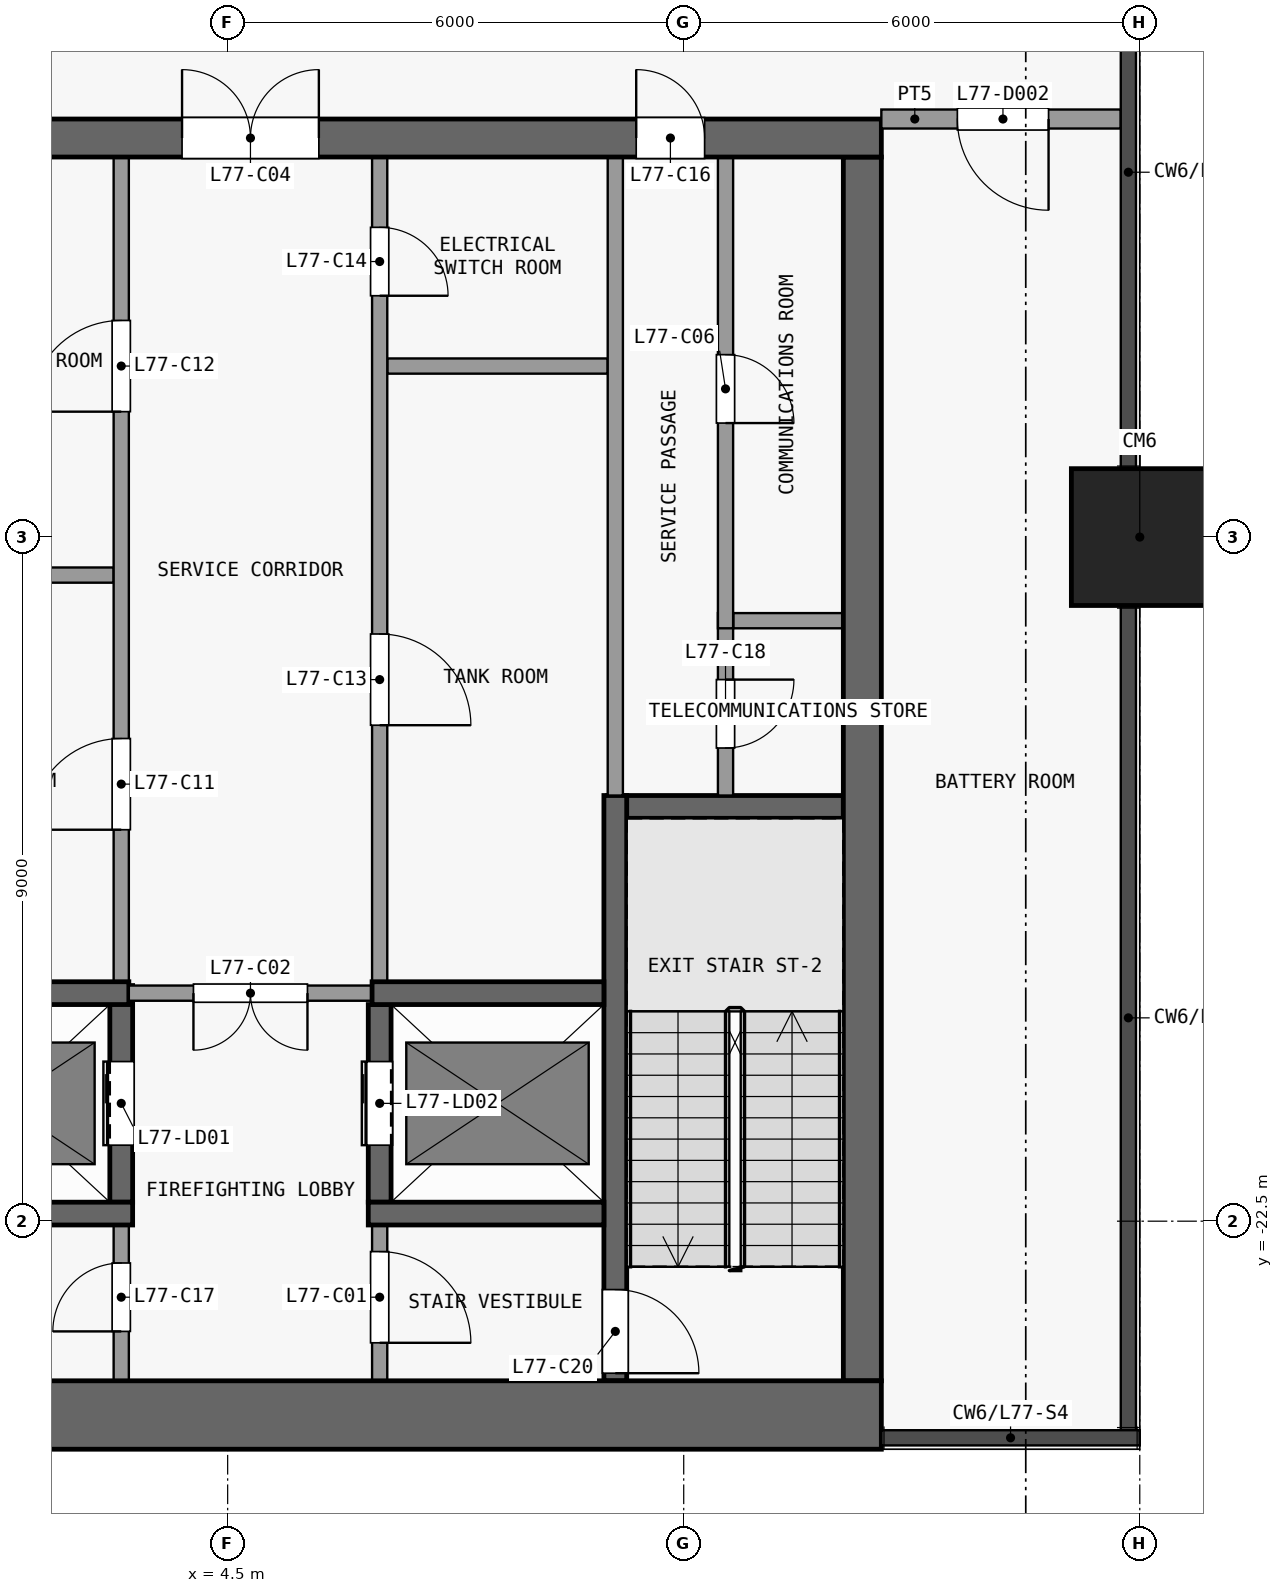
"""IFC4 building model, lengths in metres.
Left out: names, types, materials, properties, quantities, classifications, styles, units other than length and angle.
Written with IfcOpenShell. Run it as: python <this file> out.ifc"""

import sys

from ifc_helpers import new_model, si_unit, direction, frame, frame_2d, origin, origin_2d, place, context, subcontext, project, spatial, rectangle, extrude, element, fill, save


model = new_model("IFC4")
c1 = context("Model", 3, precision=1e-05, world=origin(), true_north=direction((0.0, 1.0)))
c2 = subcontext(c1, "Body", "Model", "MODEL_VIEW")
j1 = project(units=[si_unit("LENGTHUNIT", "METRE"), si_unit("PLANEANGLEUNIT", "RADIAN")], contexts=[c1])
p1 = place(None, origin())
s1 = spatial("IfcSite", under=j1, at=p1, CompositionType="ELEMENT")
p2 = place(p1, origin())
s2 = spatial("IfcBuilding", under=s1, at=p2, CompositionType="ELEMENT")
p3 = place(p2, frame((0.0, 0.0, 303.2)))
s3 = spatial("IfcBuildingStorey", under=s2, at=p3, CompositionType="ELEMENT", Elevation=303.2)
p4 = place(p3, frame((16.5, -13.5, 0.0), z_axis=(0.0, 0.0, 1.0), x_axis=(1.0, 0.0, 0.0)))
e1 = element("IfcColumn", 1, at=p4, inside=s3, PredefinedType="COLUMN", context=c2, shape_type="SweptSolid", body=[
    extrude(rectangle(XDim=1.8, YDim=1.8, at=origin_2d()), origin(), (0.0, 0.0, 1.0), 4.5),
])
p5 = place(p3, frame((-13.1, -25.05, 0.0), z_axis=(0.0, 0.0, 1.0), x_axis=(1.0, 0.0, 0.0)))
e2 = element("IfcWall", 2, at=p5, inside=s3, PredefinedType="SHEAR", context=c2, shape_type="SweptSolid", body=[
    extrude(rectangle(XDim=26.2, YDim=0.9, at=frame_2d((13.1, 0.0))), origin(), (0.0, 0.0, 1.0), 4.2),
])
p6 = place(p3, frame((-13.1, -8.25, 0.0), z_axis=(0.0, 0.0, 1.0), x_axis=(1.0, 0.0, 0.0)))
e3 = element("IfcWall", 3, at=p6, inside=s3, PredefinedType="SHEAR", context=c2, shape_type="SweptSolid", body=[
    extrude(rectangle(XDim=26.2, YDim=0.5, at=frame_2d((13.1, 0.0))), origin(), (0.0, 0.0, 1.0), 4.2),
])
p7 = place(p6, frame((7.4, 0.0, 0.0)))
e4 = element("IfcOpeningElement", 4, at=p7, cuts=e3, PredefinedType="OPENING", context=c2, shape_type="SweptSolid", body=[
    extrude(rectangle(XDim=1.8, YDim=2.1, at=frame_2d((0.9, 1.05))), frame((0.0, 0.26, 0.0), z_axis=(0.0, -1.0, 0.0), x_axis=(1.0, 0.0, 0.0)), (0.0, 0.0, 1.0), 0.52),
])
p8 = place(p6, frame((17.0, 0.0, 0.0)))
e5 = element("IfcOpeningElement", 5, at=p8, cuts=e3, PredefinedType="OPENING", context=c2, shape_type="SweptSolid", body=[
    extrude(rectangle(XDim=1.8, YDim=2.1, at=frame_2d((0.9, 1.05))), frame((0.0, 0.26, 0.0), z_axis=(0.0, -1.0, 0.0), x_axis=(1.0, 0.0, 0.0)), (0.0, 0.0, 1.0), 0.52),
])
p9 = place(p6, frame((1.325, 0.0, 0.0)))
e6 = element("IfcOpeningElement", 6, at=p9, cuts=e3, PredefinedType="OPENING", context=c2, shape_type="SweptSolid", body=[
    extrude(rectangle(XDim=1.2, YDim=2.1, at=frame_2d((0.6, 1.05))), frame((0.0, 0.26, 0.0), z_axis=(0.0, -1.0, 0.0), x_axis=(1.0, 0.0, 0.0)), (0.0, 0.0, 1.0), 0.52),
])
p10 = place(p6, frame((22.975, 0.0, 0.0)))
e7 = element("IfcOpeningElement", 7, at=p10, cuts=e3, PredefinedType="OPENING", context=c2, shape_type="SweptSolid", body=[
    extrude(rectangle(XDim=0.9, YDim=2.1, at=frame_2d((0.45, 1.05))), frame((0.0, 0.26, 0.0), z_axis=(0.0, -1.0, 0.0), x_axis=(1.0, 0.0, 0.0)), (0.0, 0.0, 1.0), 0.52),
])
p11 = place(p3, frame((12.85, -24.6, 0.0), z_axis=(0.0, 0.0, 1.0), x_axis=(0.0, 1.0, 0.0)))
e8 = element("IfcWall", 8, at=p11, inside=s3, PredefinedType="SHEAR", context=c2, shape_type="SweptSolid", body=[
    extrude(rectangle(XDim=16.1, YDim=0.5, at=frame_2d((8.05, 0.0))), origin(), (0.0, 0.0, 1.0), 4.2),
])
p12 = place(p3, frame((-3.25, -22.4, 0.0), z_axis=(0.0, 0.0, 1.0), x_axis=(1.0, 0.0, 0.0)))
e9 = element("IfcWall", 9, at=p12, inside=s3, PredefinedType="SHEAR", context=c2, shape_type="SweptSolid", body=[
    extrude(rectangle(XDim=6.5, YDim=0.3, at=frame_2d((3.25, 0.0))), origin(), (0.0, 0.0, 1.0), 4.2),
])
p13 = place(p3, frame((6.35, -22.4, 0.0), z_axis=(0.0, 0.0, 1.0), x_axis=(1.0, 0.0, 0.0)))
e10 = element("IfcWall", 10, at=p13, inside=s3, PredefinedType="SHEAR", context=c2, shape_type="SweptSolid", body=[
    extrude(rectangle(XDim=3.1, YDim=0.3, at=frame_2d((1.55, 0.0))), origin(), (0.0, 0.0, 1.0), 4.2),
])
p14 = place(p3, frame((-0.1, -19.5, 0.0), z_axis=(0.0, 0.0, 1.0), x_axis=(1.0, 0.0, 0.0)))
e11 = element("IfcWall", 11, at=p14, inside=s3, PredefinedType="SHEAR", context=c2, shape_type="SweptSolid", body=[
    extrude(rectangle(XDim=3.3, YDim=0.3, at=frame_2d((1.65, 0.0))), origin(), (0.0, 0.0, 1.0), 4.2),
])
p15 = place(p3, frame((6.4, -19.5, 0.0), z_axis=(0.0, 0.0, 1.0), x_axis=(-1.0, 0.0, 0.0)))
e12 = element("IfcWall", 12, at=p15, inside=s3, PredefinedType="PARTITIONING", context=c2, shape_type="SweptSolid", body=[
    extrude(rectangle(XDim=3.2, YDim=0.2, at=frame_2d((1.6, 0.0))), origin(), (0.0, 0.0, 1.0), 4.2),
])
p16 = place(p15, frame((0.85, 0.0, 0.0)))
e13 = element("IfcOpeningElement", 13, at=p16, cuts=e12, PredefinedType="OPENING", context=c2, shape_type="SweptSolid", body=[
    extrude(rectangle(XDim=1.5, YDim=2.1, at=frame_2d((0.75, 1.05))), frame((0.0, 0.11, 0.0), z_axis=(0.0, -1.0, 0.0), x_axis=(1.0, 0.0, 0.0)), (0.0, 0.0, 1.0), 0.22),
])
p17 = place(p3, frame((6.4, -19.5, 0.0), z_axis=(0.0, 0.0, 1.0), x_axis=(1.0, 0.0, 0.0)))
e14 = element("IfcWall", 14, at=p17, inside=s3, PredefinedType="SHEAR", context=c2, shape_type="SweptSolid", body=[
    extrude(rectangle(XDim=3.05, YDim=0.3, at=frame_2d((1.525, 0.0))), origin(), (0.0, 0.0, 1.0), 4.2),
])
p18 = place(p3, frame((9.5, -17.05, 0.0), z_axis=(0.0, 0.0, 1.0), x_axis=(1.0, 0.0, 0.0)))
e15 = element("IfcWall", 15, at=p18, inside=s3, PredefinedType="SHEAR", context=c2, shape_type="SweptSolid", body=[
    extrude(rectangle(XDim=3.1, YDim=0.3, at=frame_2d((1.55, 0.0))), origin(), (0.0, 0.0, 1.0), 4.2),
])
p19 = place(p3, frame((11.15, -14.6, 0.0), z_axis=(0.0, 0.0, 1.0), x_axis=(1.0, 0.0, 0.0)))
e16 = element("IfcWall", 16, at=p19, inside=s3, PredefinedType="PARTITIONING", context=c2, shape_type="SweptSolid", body=[
    extrude(rectangle(XDim=1.45, YDim=0.2, at=frame_2d((0.725, 0.0))), origin(), (0.0, 0.0, 1.0), 4.2),
])
for number, where, z_axis, x_axis in (
    (17, (0.1, -14.0, 0.0), (0.0, 0.0, 1.0), (1.0, 0.0, 0.0)),
    (18, (6.6, -11.25, 0.0), (0.0, 0.0, 1.0), (1.0, 0.0, 0.0)),
):
    element("IfcWall", number, at=place(p3, frame(where, z_axis=z_axis, x_axis=x_axis)), inside=s3, PredefinedType="PARTITIONING", context=c2, shape_type="SweptSolid", body=[
        extrude(rectangle(XDim=2.9, YDim=0.2, at=frame_2d((1.45, 0.0))), origin(), (0.0, 0.0, 1.0), 4.2),
    ])
p20 = place(p3, frame((3.1, -24.6, 0.0), z_axis=(0.0, 0.0, 1.0), x_axis=(0.0, 1.0, 0.0)))
e19 = element("IfcWall", 19, at=p20, inside=s3, PredefinedType="PARTITIONING", context=c2, shape_type="SweptSolid", body=[
    extrude(rectangle(XDim=2.05, YDim=0.2, at=frame_2d((1.025, 0.0))), origin(), (0.0, 0.0, 1.0), 4.2),
])
p21 = place(p20, frame((0.65, 0.0, 0.0)))
e20 = element("IfcOpeningElement", 20, at=p21, cuts=e19, PredefinedType="OPENING", context=c2, shape_type="SweptSolid", body=[
    extrude(rectangle(XDim=0.9, YDim=2.1, at=frame_2d((0.45, 1.05))), frame((0.0, 0.11, 0.0), z_axis=(0.0, -1.0, 0.0), x_axis=(1.0, 0.0, 0.0)), (0.0, 0.0, 1.0), 0.22),
])
p22 = place(p3, frame((3.1, -22.25, 0.0), z_axis=(0.0, 0.0, 1.0), x_axis=(0.0, 1.0, 0.0)))
e21 = element("IfcWall", 21, at=p22, inside=s3, PredefinedType="SHEAR", context=c2, shape_type="SweptSolid", body=[
    extrude(rectangle(XDim=2.85, YDim=0.3, at=frame_2d((1.425, 0.0))), origin(), (0.0, 0.0, 1.0), 4.2),
])
p23 = place(p22, frame((0.75, 0.0, 0.0)))
e22 = element("IfcOpeningElement", 22, at=p23, cuts=e21, PredefinedType="OPENING", context=c2, shape_type="SweptSolid", body=[
    extrude(rectangle(XDim=1.1, YDim=2.1, at=frame_2d((0.55, 1.05))), frame((0.0, 0.16, 0.0), z_axis=(0.0, -1.0, 0.0), x_axis=(1.0, 0.0, 0.0)), (0.0, 0.0, 1.0), 0.32),
])
p24 = place(p3, frame((3.1, -19.6, 0.0), z_axis=(0.0, 0.0, 1.0), x_axis=(0.0, 1.0, 0.0)))
e23 = element("IfcWall", 23, at=p24, inside=s3, PredefinedType="PARTITIONING", context=c2, shape_type="SweptSolid", body=[
    extrude(rectangle(XDim=11.1, YDim=0.2, at=frame_2d((5.55, 0.0))), origin(), (0.0, 0.0, 1.0), 4.2),
])
p25 = place(p24, frame((2.25, 0.0, 0.0)))
e24 = element("IfcOpeningElement", 24, at=p25, cuts=e23, PredefinedType="OPENING", context=c2, shape_type="SweptSolid", body=[
    extrude(rectangle(XDim=1.2, YDim=2.1, at=frame_2d((0.6, 1.05))), frame((0.0, 0.11, 0.0), z_axis=(0.0, -1.0, 0.0), x_axis=(1.0, 0.0, 0.0)), (0.0, 0.0, 1.0), 0.22),
])
p26 = place(p24, frame((7.75, 0.0, 0.0)))
e25 = element("IfcOpeningElement", 25, at=p26, cuts=e23, PredefinedType="OPENING", context=c2, shape_type="SweptSolid", body=[
    extrude(rectangle(XDim=1.2, YDim=2.1, at=frame_2d((0.6, 1.05))), frame((0.0, 0.11, 0.0), z_axis=(0.0, -1.0, 0.0), x_axis=(1.0, 0.0, 0.0)), (0.0, 0.0, 1.0), 0.22),
])
p27 = place(p3, frame((6.5, -22.55, 0.0), z_axis=(0.0, 0.0, 1.0), x_axis=(0.0, -1.0, 0.0)))
e26 = element("IfcWall", 26, at=p27, inside=s3, PredefinedType="PARTITIONING", context=c2, shape_type="SweptSolid", body=[
    extrude(rectangle(XDim=2.05, YDim=0.2, at=frame_2d((1.025, 0.0))), origin(), (0.0, 0.0, 1.0), 4.2),
])
p28 = place(p27, frame((0.35, 0.0, 0.0)))
e27 = element("IfcOpeningElement", 27, at=p28, cuts=e26, PredefinedType="OPENING", context=c2, shape_type="SweptSolid", body=[
    extrude(rectangle(XDim=1.2, YDim=2.1, at=frame_2d((0.6, 1.05))), frame((0.0, 0.11, 0.0), z_axis=(0.0, -1.0, 0.0), x_axis=(1.0, 0.0, 0.0)), (0.0, 0.0, 1.0), 0.22),
])
p29 = place(p3, frame((6.5, -22.25, 0.0), z_axis=(0.0, 0.0, 1.0), x_axis=(0.0, 1.0, 0.0)))
e28 = element("IfcWall", 28, at=p29, inside=s3, PredefinedType="SHEAR", context=c2, shape_type="SweptSolid", body=[
    extrude(rectangle(XDim=2.6, YDim=0.3, at=frame_2d((1.3, 0.0))), origin(), (0.0, 0.0, 1.0), 4.2),
])
p30 = place(p29, frame((0.75, 0.0, 0.0)))
e29 = element("IfcOpeningElement", 29, at=p30, cuts=e28, PredefinedType="OPENING", context=c2, shape_type="SweptSolid", body=[
    extrude(rectangle(XDim=1.1, YDim=2.1, at=frame_2d((0.55, 1.05))), frame((0.0, 0.16, 0.0), z_axis=(0.0, -1.0, 0.0), x_axis=(1.0, 0.0, 0.0)), (0.0, 0.0, 1.0), 0.32),
])
p31 = place(p3, frame((6.5, -8.5, 0.0), z_axis=(0.0, 0.0, 1.0), x_axis=(0.0, -1.0, 0.0)))
e30 = element("IfcWall", 30, at=p31, inside=s3, PredefinedType="PARTITIONING", context=c2, shape_type="SweptSolid", body=[
    extrude(rectangle(XDim=10.85, YDim=0.2, at=frame_2d((5.425, 0.0))), origin(), (0.0, 0.0, 1.0), 4.2),
])
p32 = place(p31, frame((6.275, 0.0, 0.0)))
e31 = element("IfcOpeningElement", 31, at=p32, cuts=e30, PredefinedType="OPENING", context=c2, shape_type="SweptSolid", body=[
    extrude(rectangle(XDim=1.2, YDim=2.1, at=frame_2d((0.6, 1.05))), frame((0.0, 0.11, 0.0), z_axis=(0.0, -1.0, 0.0), x_axis=(1.0, 0.0, 0.0)), (0.0, 0.0, 1.0), 0.22),
])
p33 = place(p31, frame((0.925, 0.0, 0.0)))
e32 = element("IfcOpeningElement", 32, at=p33, cuts=e30, PredefinedType="OPENING", context=c2, shape_type="SweptSolid", body=[
    extrude(rectangle(XDim=0.9, YDim=2.1, at=frame_2d((0.45, 1.05))), frame((0.0, 0.11, 0.0), z_axis=(0.0, -1.0, 0.0), x_axis=(1.0, 0.0, 0.0)), (0.0, 0.0, 1.0), 0.22),
])
p34 = place(p3, frame((9.6, -16.9, 0.0), z_axis=(0.0, 0.0, 1.0), x_axis=(0.0, -1.0, 0.0)))
e33 = element("IfcWall", 33, at=p34, inside=s3, PredefinedType="SHEAR", context=c2, shape_type="SweptSolid", body=[
    extrude(rectangle(XDim=7.7, YDim=0.3, at=frame_2d((3.85, 0.0))), origin(), (0.0, 0.0, 1.0), 4.2),
])
p35 = place(p34, frame((6.5, 0.0, 0.0)))
e34 = element("IfcOpeningElement", 34, at=p35, cuts=e33, PredefinedType="OPENING", context=c2, shape_type="SweptSolid", body=[
    extrude(rectangle(XDim=1.1, YDim=2.1, at=frame_2d((0.55, 1.05))), frame((0.0, 0.16, 0.0), z_axis=(0.0, -1.0, 0.0), x_axis=(1.0, 0.0, 0.0)), (0.0, 0.0, 1.0), 0.32),
])
p36 = place(p3, frame((9.6, -16.9, 0.0), z_axis=(0.0, 0.0, 1.0), x_axis=(0.0, 1.0, 0.0)))
e35 = element("IfcWall", 35, at=p36, inside=s3, PredefinedType="PARTITIONING", context=c2, shape_type="SweptSolid", body=[
    extrude(rectangle(XDim=8.4, YDim=0.2, at=frame_2d((4.2, 0.0))), origin(), (0.0, 0.0, 1.0), 4.2),
])
p37 = place(p3, frame((11.05, -14.5, 0.0), z_axis=(0.0, 0.0, 1.0), x_axis=(0.0, -1.0, 0.0)))
e36 = element("IfcWall", 36, at=p37, inside=s3, PredefinedType="PARTITIONING", context=c2, shape_type="SweptSolid", body=[
    extrude(rectangle(XDim=2.4, YDim=0.2, at=frame_2d((1.2, 0.0))), origin(), (0.0, 0.0, 1.0), 4.2),
])
p38 = place(p37, frame((0.875, 0.0, 0.0)))
e37 = element("IfcOpeningElement", 37, at=p38, cuts=e36, PredefinedType="OPENING", context=c2, shape_type="SweptSolid", body=[
    extrude(rectangle(XDim=0.9, YDim=2.1, at=frame_2d((0.45, 1.05))), frame((0.0, 0.11, 0.0), z_axis=(0.0, -1.0, 0.0), x_axis=(1.0, 0.0, 0.0)), (0.0, 0.0, 1.0), 0.22),
])
p39 = place(p3, frame((11.05, -8.5, 0.0), z_axis=(0.0, 0.0, 1.0), x_axis=(0.0, -1.0, 0.0)))
e38 = element("IfcWall", 38, at=p39, inside=s3, PredefinedType="PARTITIONING", context=c2, shape_type="SweptSolid", body=[
    extrude(rectangle(XDim=6.2, YDim=0.2, at=frame_2d((3.1, 0.0))), origin(), (0.0, 0.0, 1.0), 4.2),
])
p40 = place(p39, frame((2.6, 0.0, 0.0)))
e39 = element("IfcOpeningElement", 39, at=p40, cuts=e38, PredefinedType="OPENING", context=c2, shape_type="SweptSolid", body=[
    extrude(rectangle(XDim=0.9, YDim=2.1, at=frame_2d((0.45, 1.05))), frame((0.0, 0.11, 0.0), z_axis=(0.0, -1.0, 0.0), x_axis=(1.0, 0.0, 0.0)), (0.0, 0.0, 1.0), 0.22),
])
p41 = place(p3, frame((13.1, -8.0, 0.0), z_axis=(0.0, 0.0, 1.0), x_axis=(1.0, 0.0, 0.0)))
e40 = element("IfcWall", 40, at=p41, inside=s3, PredefinedType="PARTITIONING", context=c2, shape_type="SweptSolid", body=[
    extrude(rectangle(XDim=3.15, YDim=0.25, at=frame_2d((1.575, 0.0))), origin(), (0.0, 0.0, 1.0), 4.2),
])
p42 = place(p41, frame((1.0, 0.0, 0.0)))
e41 = element("IfcOpeningElement", 41, at=p42, cuts=e40, PredefinedType="OPENING", context=c2, shape_type="SweptSolid", body=[
    extrude(rectangle(XDim=1.2, YDim=2.1, at=frame_2d((0.6, 1.05))), frame((0.0, 0.135, 0.0), z_axis=(0.0, -1.0, 0.0), x_axis=(1.0, 0.0, 0.0)), (0.0, 0.0, 1.0), 0.27),
])
p43 = place(p23, origin())
e42 = element("IfcDoor", 42, at=p43, inside=s3, OperationType="DOUBLE_DOOR_SLIDING", PredefinedType="DOOR", context=c2, shape_type="SweptSolid", body=[
    extrude(rectangle(XDim=1.1, YDim=2.1, at=frame_2d((0.55, 1.05))), frame((0.0, 0.025, 0.0), z_axis=(0.0, -1.0, 0.0), x_axis=(1.0, 0.0, 0.0)), (0.0, 0.0, 1.0), 0.05),
])
fill(e22, e42)
p44 = place(p30, origin())
e43 = element("IfcDoor", 43, at=p44, inside=s3, OperationType="DOUBLE_DOOR_SLIDING", PredefinedType="DOOR", context=c2, shape_type="SweptSolid", body=[
    extrude(rectangle(XDim=1.1, YDim=2.1, at=frame_2d((0.55, 1.05))), frame((0.0, 0.025, 0.0), z_axis=(0.0, -1.0, 0.0), x_axis=(1.0, 0.0, 0.0)), (0.0, 0.0, 1.0), 0.05),
])
fill(e29, e43)
p45 = place(p28, origin())
e44 = element("IfcDoor", 44, at=p45, inside=s3, OperationType="SINGLE_SWING_RIGHT", PredefinedType="DOOR", context=c2, shape_type="SweptSolid", body=[
    extrude(rectangle(XDim=1.2, YDim=2.1, at=frame_2d((0.6, 1.05))), frame((0.0, 0.025, 0.0), z_axis=(0.0, -1.0, 0.0), x_axis=(1.0, 0.0, 0.0)), (0.0, 0.0, 1.0), 0.05),
])
fill(e27, e44)
p46 = place(p16, origin())
e45 = element("IfcDoor", 45, at=p46, inside=s3, OperationType="DOUBLE_DOOR_SINGLE_SWING", PredefinedType="DOOR", context=c2, shape_type="SweptSolid", body=[
    extrude(rectangle(XDim=1.5, YDim=2.1, at=frame_2d((0.75, 1.05))), frame((0.0, 0.025, 0.0), z_axis=(0.0, -1.0, 0.0), x_axis=(1.0, 0.0, 0.0)), (0.0, 0.0, 1.0), 0.05),
])
fill(e13, e45)
p47 = place(p8, origin())
e46 = element("IfcDoor", 46, at=p47, inside=s3, OperationType="DOUBLE_DOOR_SINGLE_SWING", PredefinedType="DOOR", context=c2, shape_type="SweptSolid", body=[
    extrude(rectangle(XDim=1.8, YDim=2.1, at=frame_2d((0.9, 1.05))), frame((0.0, 0.025, 0.0), z_axis=(0.0, -1.0, 0.0), x_axis=(1.0, 0.0, 0.0)), (0.0, 0.0, 1.0), 0.05),
])
fill(e5, e46)
p48 = place(p40, origin())
e47 = element("IfcDoor", 47, at=p48, inside=s3, OperationType="SINGLE_SWING_RIGHT", PredefinedType="DOOR", context=c2, shape_type="SweptSolid", body=[
    extrude(rectangle(XDim=0.9, YDim=2.1, at=frame_2d((0.45, 1.05))), frame((0.0, 0.025, 0.0), z_axis=(0.0, -1.0, 0.0), x_axis=(1.0, 0.0, 0.0)), (0.0, 0.0, 1.0), 0.05),
])
fill(e39, e47)
p49 = place(p25, origin())
e48 = element("IfcDoor", 48, at=p49, inside=s3, OperationType="SINGLE_SWING_LEFT", PredefinedType="DOOR", context=c2, shape_type="SweptSolid", body=[
    extrude(rectangle(XDim=1.2, YDim=2.1, at=frame_2d((0.6, 1.05))), frame((0.0, 0.025, 0.0), z_axis=(0.0, -1.0, 0.0), x_axis=(1.0, 0.0, 0.0)), (0.0, 0.0, 1.0), 0.05),
])
fill(e24, e48)
p50 = place(p26, origin())
e49 = element("IfcDoor", 49, at=p50, inside=s3, OperationType="SINGLE_SWING_LEFT", PredefinedType="DOOR", context=c2, shape_type="SweptSolid", body=[
    extrude(rectangle(XDim=1.2, YDim=2.1, at=frame_2d((0.6, 1.05))), frame((0.0, 0.025, 0.0), z_axis=(0.0, -1.0, 0.0), x_axis=(1.0, 0.0, 0.0)), (0.0, 0.0, 1.0), 0.05),
])
fill(e25, e49)
p51 = place(p32, origin())
e50 = element("IfcDoor", 50, at=p51, inside=s3, OperationType="SINGLE_SWING_RIGHT", PredefinedType="DOOR", context=c2, shape_type="SweptSolid", body=[
    extrude(rectangle(XDim=1.2, YDim=2.1, at=frame_2d((0.6, 1.05))), frame((0.0, 0.025, 0.0), z_axis=(0.0, -1.0, 0.0), x_axis=(1.0, 0.0, 0.0)), (0.0, 0.0, 1.0), 0.05),
])
fill(e31, e50)
p52 = place(p33, origin())
e51 = element("IfcDoor", 51, at=p52, inside=s3, OperationType="SINGLE_SWING_RIGHT", PredefinedType="DOOR", context=c2, shape_type="SweptSolid", body=[
    extrude(rectangle(XDim=0.9, YDim=2.1, at=frame_2d((0.45, 1.05))), frame((0.0, 0.025, 0.0), z_axis=(0.0, -1.0, 0.0), x_axis=(1.0, 0.0, 0.0)), (0.0, 0.0, 1.0), 0.05),
])
fill(e32, e51)
p53 = place(p10, origin())
e52 = element("IfcDoor", 52, at=p53, inside=s3, OperationType="SINGLE_SWING_LEFT", PredefinedType="DOOR", context=c2, shape_type="SweptSolid", body=[
    extrude(rectangle(XDim=0.9, YDim=2.1, at=frame_2d((0.45, 1.05))), frame((0.0, 0.025, 0.0), z_axis=(0.0, -1.0, 0.0), x_axis=(1.0, 0.0, 0.0)), (0.0, 0.0, 1.0), 0.05),
])
fill(e7, e52)
p54 = place(p21, origin())
e53 = element("IfcDoor", 53, at=p54, inside=s3, OperationType="SINGLE_SWING_LEFT", PredefinedType="DOOR", context=c2, shape_type="SweptSolid", body=[
    extrude(rectangle(XDim=0.9, YDim=2.1, at=frame_2d((0.45, 1.05))), frame((0.0, 0.025, 0.0), z_axis=(0.0, -1.0, 0.0), x_axis=(1.0, 0.0, 0.0)), (0.0, 0.0, 1.0), 0.05),
])
fill(e20, e53)
p55 = place(p38, origin())
e54 = element("IfcDoor", 54, at=p55, inside=s3, OperationType="SINGLE_SWING_LEFT", PredefinedType="DOOR", context=c2, shape_type="SweptSolid", body=[
    extrude(rectangle(XDim=0.9, YDim=2.1, at=frame_2d((0.45, 1.05))), frame((0.0, 0.025, 0.0), z_axis=(0.0, -1.0, 0.0), x_axis=(1.0, 0.0, 0.0)), (0.0, 0.0, 1.0), 0.05),
])
fill(e37, e54)
p56 = place(p35, origin())
e55 = element("IfcDoor", 55, at=p56, inside=s3, OperationType="SINGLE_SWING_RIGHT", PredefinedType="DOOR", context=c2, shape_type="SweptSolid", body=[
    extrude(rectangle(XDim=1.1, YDim=2.1, at=frame_2d((0.55, 1.05))), frame((0.0, 0.025, 0.0), z_axis=(0.0, -1.0, 0.0), x_axis=(1.0, 0.0, 0.0)), (0.0, 0.0, 1.0), 0.05),
])
fill(e34, e55)
p57 = place(p42, origin())
e56 = element("IfcDoor", 56, at=p57, inside=s3, OperationType="SINGLE_SWING_RIGHT", PredefinedType="DOOR", context=c2, shape_type="SweptSolid", body=[
    extrude(rectangle(XDim=1.2, YDim=2.1, at=frame_2d((0.6, 1.05))), frame((0.0, 0.025, 0.0), z_axis=(0.0, -1.0, 0.0), x_axis=(1.0, 0.0, 0.0)), (0.0, 0.0, 1.0), 0.05),
])
fill(e41, e56)
save(model, sys.argv[1])
